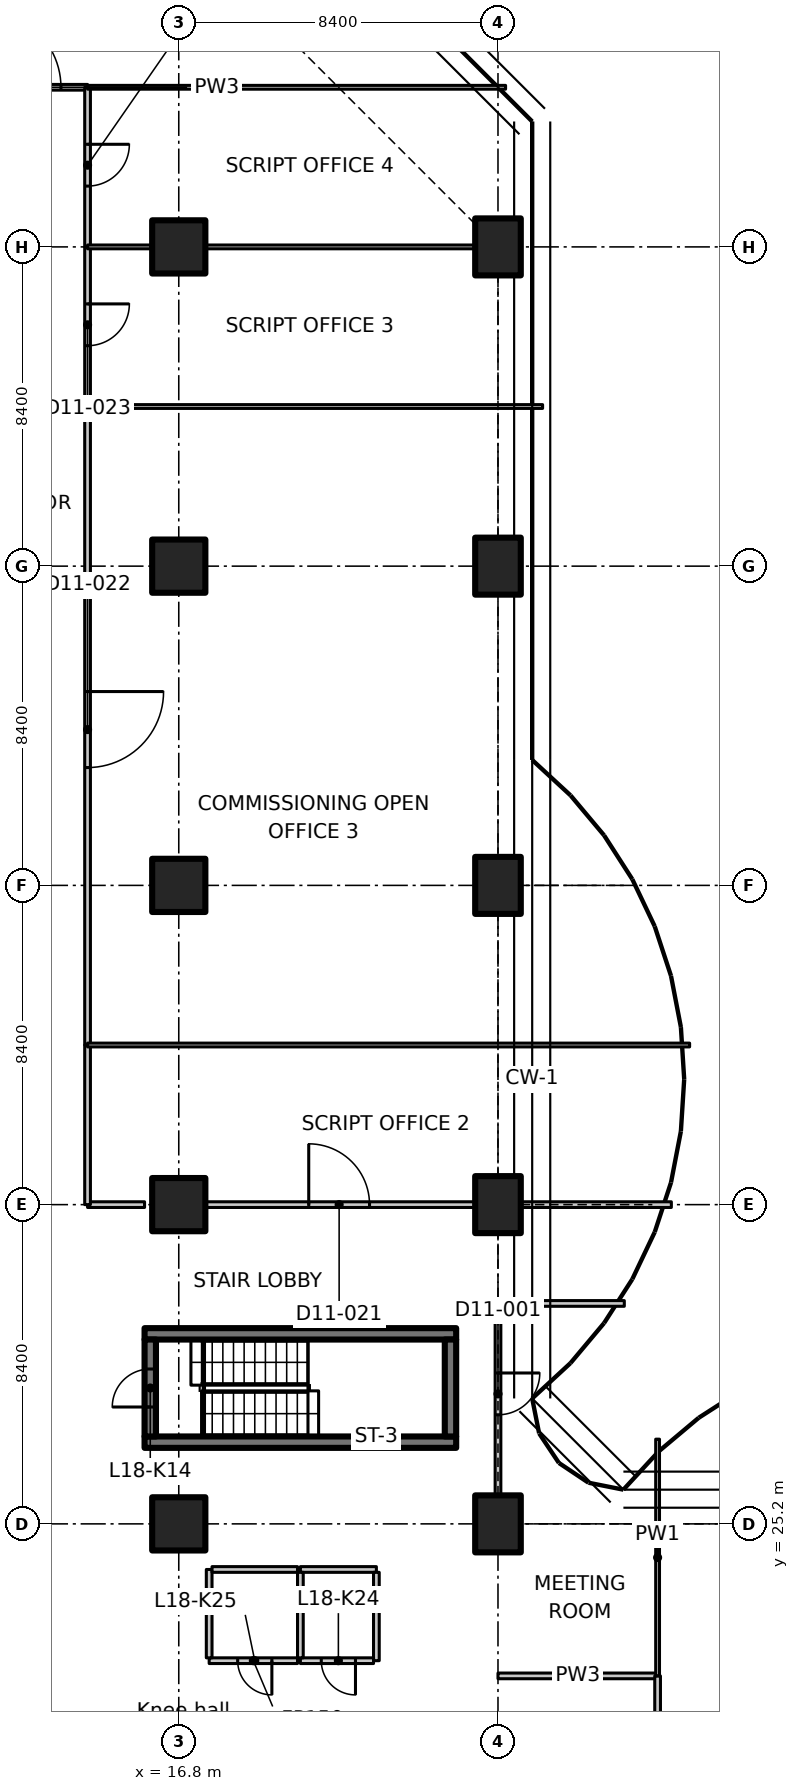
"""IFC4 building model, lengths in metres.
Left out: names, types, materials, properties, quantities, classifications, styles, units other than length and angle.
Written with IfcOpenShell. Run it as: python <this file> out.ifc"""

import sys

from ifc_helpers import new_model, si_unit, direction, frame, frame_2d, origin, origin_2d, place, context, subcontext, project, spatial, polyline, rectangle, outline, extrude, element, fill, save


model = new_model("IFC4")
c1 = context("Model", 3, precision=1e-05, world=origin(), true_north=direction((0.0, 1.0)))
c2 = subcontext(c1, "Body", "Model", "MODEL_VIEW")
j1 = project(units=[si_unit("LENGTHUNIT", "METRE"), si_unit("PLANEANGLEUNIT", "RADIAN")], contexts=[c1])
p1 = place(None, origin())
s1 = spatial("IfcSite", under=j1, at=p1, CompositionType="ELEMENT")
p2 = place(p1, origin())
s2 = spatial("IfcBuilding", under=s1, at=p2, CompositionType="ELEMENT")
p3 = place(p2, frame((0.0, 0.0, 79.7)))
s3 = spatial("IfcBuildingStorey", under=s2, at=p3, CompositionType="ELEMENT", Elevation=79.7)
for number, where, z_axis, x_axis in (
    (1, (16.8, 25.2, 0.0), (0.0, 0.0, 1.0), (1.0, 0.0, 0.0)),
    (2, (16.8, 33.6, 0.0), (0.0, 0.0, 1.0), (1.0, 0.0, 0.0)),
    (3, (16.8, 42.0, 0.0), (0.0, 0.0, 1.0), (1.0, 0.0, 0.0)),
    (4, (16.8, 50.4, 0.0), (0.0, 0.0, 1.0), (1.0, 0.0, 0.0)),
    (5, (16.8, 58.8, 0.0), (0.0, 0.0, 1.0), (1.0, 0.0, 0.0)),
):
    element("IfcColumn", number, at=place(p3, frame(where, z_axis=z_axis, x_axis=x_axis)), inside=s3, PredefinedType="COLUMN", context=c2, shape_type="SweptSolid", body=[
        extrude(rectangle(XDim=1.4, YDim=1.4, at=origin_2d()), origin(), (0.0, 0.0, 1.0), 3.35),
    ])
for number, where, z_axis, x_axis in (
    (6, (25.2, 25.2, 0.0), (0.0, 0.0, 1.0), (1.0, 0.0, 0.0)),
    (7, (25.2, 33.6, 0.0), (0.0, 0.0, 1.0), (1.0, 0.0, 0.0)),
    (8, (25.2, 42.0, 0.0), (0.0, 0.0, 1.0), (1.0, 0.0, 0.0)),
    (9, (25.2, 50.4, 0.0), (0.0, 0.0, 1.0), (1.0, 0.0, 0.0)),
    (10, (25.2, 58.8, 0.0), (0.0, 0.0, 1.0), (1.0, 0.0, 0.0)),
):
    element("IfcColumn", number, at=place(p3, frame(where, z_axis=z_axis, x_axis=x_axis)), inside=s3, PredefinedType="COLUMN", context=c2, shape_type="SweptSolid", body=[
        extrude(rectangle(XDim=1.2, YDim=1.5, at=origin_2d()), origin(), (0.0, 0.0, 1.0), 3.35),
    ])
for number, where, z_axis, x_axis in (
    (11, (15.9, 27.35, 0.0), (0.0, 0.0, 1.0), (1.0, 0.0, 0.0)),
    (12, (15.9, 30.2, 0.0), (0.0, 0.0, 1.0), (1.0, 0.0, 0.0)),
):
    element("IfcWall", number, at=place(p3, frame(where, z_axis=z_axis, x_axis=x_axis)), inside=s3, PredefinedType="SHEAR", context=c2, shape_type="SweptSolid", body=[
        extrude(rectangle(XDim=8.2, YDim=0.3, at=frame_2d((4.1, 0.0))), origin(), (0.0, 0.0, 1.0), 3.35),
    ])
p4 = place(p3, frame((16.05, 27.5, 0.0), z_axis=(0.0, 0.0, 1.0), x_axis=(0.0, 1.0, 0.0)))
e13 = element("IfcWall", 13, at=p4, inside=s3, PredefinedType="SHEAR", context=c2, shape_type="SweptSolid", body=[
    extrude(rectangle(XDim=2.55, YDim=0.3, at=frame_2d((1.275, 0.0))), origin(), (0.0, 0.0, 1.0), 3.35),
])
p5 = place(p4, frame((0.775, 0.0, 0.0)))
e14 = element("IfcOpeningElement", 14, at=p5, cuts=e13, PredefinedType="OPENING", context=c2, shape_type="SweptSolid", body=[
    extrude(rectangle(XDim=1.0, YDim=2.1, at=frame_2d((0.5, 1.05))), frame((0.0, 0.16, 0.0), z_axis=(0.0, -1.0, 0.0), x_axis=(1.0, 0.0, 0.0)), (0.0, 0.0, 1.0), 0.32),
])
p6 = place(p3, frame((23.95, 27.5, 0.0), z_axis=(0.0, 0.0, 1.0), x_axis=(0.0, 1.0, 0.0)))
e15 = element("IfcWall", 15, at=p6, inside=s3, PredefinedType="SHEAR", context=c2, shape_type="SweptSolid", body=[
    extrude(rectangle(XDim=2.55, YDim=0.3, at=frame_2d((1.275, 0.0))), origin(), (0.0, 0.0, 1.0), 3.35),
])
p7 = place(p3, frame((20.0, 24.0, 0.0), z_axis=(0.0, 0.0, 1.0), x_axis=(1.0, 0.0, 0.0)))
e16 = element("IfcWall", 16, at=p7, inside=s3, PredefinedType="PARTITIONING", context=c2, shape_type="SweptSolid", body=[
    extrude(rectangle(XDim=2.0, YDim=0.15, at=frame_2d((1.0, 0.0))), origin(), (0.0, 0.0, 1.0), 3.35),
])
p8 = place(p3, frame((22.0, 23.925, 0.0), z_axis=(0.0, 0.0, 1.0), x_axis=(0.0, -1.0, 0.0)))
e17 = element("IfcWall", 17, at=p8, inside=s3, PredefinedType="PARTITIONING", context=c2, shape_type="SweptSolid", body=[
    extrude(rectangle(XDim=2.325, YDim=0.15, at=frame_2d((1.163, 0.0))), origin(), (0.0, 0.0, 1.0), 3.35),
])
p9 = place(p3, frame((21.925, 21.6, 0.0), z_axis=(0.0, 0.0, 1.0), x_axis=(-1.0, 0.0, 0.0)))
e18 = element("IfcWall", 18, at=p9, inside=s3, PredefinedType="PARTITIONING", context=c2, shape_type="SweptSolid", body=[
    extrude(rectangle(XDim=1.925, YDim=0.15, at=frame_2d((0.962, 0.0))), origin(), (0.0, 0.0, 1.0), 3.35),
])
p10 = place(p9, frame((0.475, 0.0, 0.0)))
e19 = element("IfcOpeningElement", 19, at=p10, cuts=e18, PredefinedType="OPENING", context=c2, shape_type="SweptSolid", body=[
    extrude(rectangle(XDim=0.9, YDim=2.1, at=frame_2d((0.45, 1.05))), frame((0.0, 0.085, 0.0), z_axis=(0.0, -1.0, 0.0), x_axis=(1.0, 0.0, 0.0)), (0.0, 0.0, 1.0), 0.17),
])
p11 = place(p3, frame((20.0, 21.675, 0.0), z_axis=(0.0, 0.0, 1.0), x_axis=(0.0, 1.0, 0.0)))
e20 = element("IfcWall", 20, at=p11, inside=s3, PredefinedType="PARTITIONING", context=c2, shape_type="SweptSolid", body=[
    extrude(rectangle(XDim=2.25, YDim=0.15, at=frame_2d((1.125, 0.0))), origin(), (0.0, 0.0, 1.0), 3.35),
])
p12 = place(p3, frame((19.925, 21.6, 0.0), z_axis=(0.0, 0.0, 1.0), x_axis=(-1.0, 0.0, 0.0)))
e21 = element("IfcWall", 21, at=p12, inside=s3, PredefinedType="PARTITIONING", context=c2, shape_type="SweptSolid", body=[
    extrude(rectangle(XDim=2.325, YDim=0.15, at=frame_2d((1.163, 0.0))), origin(), (0.0, 0.0, 1.0), 3.35),
])
p13 = place(p12, frame((0.675, 0.0, 0.0)))
e22 = element("IfcOpeningElement", 22, at=p13, cuts=e21, PredefinedType="OPENING", context=c2, shape_type="SweptSolid", body=[
    extrude(rectangle(XDim=0.9, YDim=2.1, at=frame_2d((0.45, 1.05))), frame((0.0, 0.085, 0.0), z_axis=(0.0, -1.0, 0.0), x_axis=(1.0, 0.0, 0.0)), (0.0, 0.0, 1.0), 0.17),
])
p14 = place(p3, frame((17.6, 21.675, 0.0), z_axis=(0.0, 0.0, 1.0), x_axis=(0.0, 1.0, 0.0)))
e23 = element("IfcWall", 23, at=p14, inside=s3, PredefinedType="PARTITIONING", context=c2, shape_type="SweptSolid", body=[
    extrude(rectangle(XDim=2.325, YDim=0.15, at=frame_2d((1.163, 0.0))), origin(), (0.0, 0.0, 1.0), 3.35),
])
p15 = place(p3, frame((17.675, 24.0, 0.0), z_axis=(0.0, 0.0, 1.0), x_axis=(1.0, 0.0, 0.0)))
e24 = element("IfcWall", 24, at=p15, inside=s3, PredefinedType="PARTITIONING", context=c2, shape_type="SweptSolid", body=[
    extrude(rectangle(XDim=2.25, YDim=0.15, at=frame_2d((1.125, 0.0))), origin(), (0.0, 0.0, 1.0), 3.35),
])
p16 = place(p3, frame((25.2, 21.2, 0.0), z_axis=(0.0, 0.0, 1.0), x_axis=(1.0, 0.0, 0.0)))
e25 = element("IfcWall", 25, at=p16, inside=s3, PredefinedType="PARTITIONING", context=c2, shape_type="SweptSolid", body=[
    extrude(rectangle(XDim=4.2, YDim=0.15, at=frame_2d((2.1, 0.0))), origin(), (0.0, 0.0, 1.0), 3.33),
])
p17 = place(p3, frame((29.4, 21.2, 0.0), z_axis=(0.0, 0.0, 1.0), x_axis=(0.0, -1.0, 0.0)))
e26 = element("IfcWall", 26, at=p17, inside=s3, PredefinedType="PARTITIONING", context=c2, shape_type="SweptSolid", body=[
    extrude(rectangle(XDim=8.2, YDim=0.15, at=frame_2d((4.1, 0.0))), origin(), (0.0, 0.0, 1.0), 3.33),
])
p18 = place(p3, frame((29.4, 27.429, 0.0), z_axis=(0.0, 0.0, 1.0), x_axis=(0.0, -1.0, 0.0)))
e27 = element("IfcWall", 27, at=p18, inside=s3, PredefinedType="PARTITIONING", context=c2, shape_type="SweptSolid", body=[
    extrude(outline(polyline([(0.0, 0.0), (6.229, 0.0), (6.229, 3.33), (2.679, 3.33), (2.677, 2.98), (1.781, 2.98), (1.779, 3.33), (0.154, 3.33), (0.0, 3.33), (0.0, 0.0)])), frame((0.0, 0.05, 0.0), z_axis=(0.0, -1.0, 0.0), x_axis=(1.0, 0.0, 0.0)), (0.0, 0.0, 1.0), 0.1),
])
p19 = place(p3, frame((25.2, 31.0, 0.0), z_axis=(0.0, 0.0, 1.0), x_axis=(0.0, -1.0, 0.0)))
e28 = element("IfcWall", 28, at=p19, inside=s3, PredefinedType="PARTITIONING", context=c2, shape_type="SweptSolid", body=[
    extrude(outline(polyline([(0.0, 0.0), (5.03, 0.0), (5.03, 2.98), (0.0, 2.98), (0.0, 0.0)])), frame((0.0, 0.075, 0.0), z_axis=(0.0, -1.0, 0.0), x_axis=(1.0, 0.0, 0.0)), (0.0, 0.0, 1.0), 0.15),
])
p20 = place(p19, frame((1.83, 0.0, 0.0)))
e29 = element("IfcOpeningElement", 29, at=p20, cuts=e28, PredefinedType="OPENING", context=c2, shape_type="SweptSolid", body=[
    extrude(rectangle(XDim=1.1, YDim=2.1, at=frame_2d((0.55, 1.05))), frame((0.0, 0.085, 0.0), z_axis=(0.0, -1.0, 0.0), x_axis=(1.0, 0.0, 0.0)), (0.0, 0.0, 1.0), 0.17),
])
p21 = place(p3, frame((25.2, 31.0, 0.0), z_axis=(0.0, 0.0, 1.0), x_axis=(1.0, 0.0, 0.0)))
e30 = element("IfcWall", 30, at=p21, inside=s3, PredefinedType="PARTITIONING", context=c2, shape_type="SweptSolid", body=[
    extrude(rectangle(XDim=3.324, YDim=0.15, at=frame_2d((1.662, 0.0))), origin(), (0.0, 0.0, 1.0), 2.98),
])
p22 = place(p3, frame((14.4, 33.6, 0.0), z_axis=(0.0, 0.0, 1.0), x_axis=(1.0, 0.0, 0.0)))
e31 = element("IfcWall", 31, at=p22, inside=s3, PredefinedType="PARTITIONING", context=c2, shape_type="SweptSolid", body=[
    extrude(rectangle(XDim=1.5, YDim=0.15, at=frame_2d((0.75, 0.0))), origin(), (0.0, 0.0, 1.0), 3.33),
])
p23 = place(p3, frame((17.52, 33.6, 0.0), z_axis=(0.0, 0.0, 1.0), x_axis=(1.0, 0.0, 0.0)))
e32 = element("IfcWall", 32, at=p23, inside=s3, PredefinedType="PARTITIONING", context=c2, shape_type="SweptSolid", body=[
    extrude(rectangle(XDim=7.06, YDim=0.15, at=frame_2d((3.53, 0.0))), origin(), (0.0, 0.0, 1.0), 3.33),
])
p24 = place(p23, frame((2.7, 0.0, 0.0)))
e33 = element("IfcOpeningElement", 33, at=p24, cuts=e32, PredefinedType="OPENING", context=c2, shape_type="SweptSolid", body=[
    extrude(rectangle(XDim=1.6, YDim=2.1, at=frame_2d((0.8, 1.05))), frame((0.0, 0.085, 0.0), z_axis=(0.0, -1.0, 0.0), x_axis=(1.0, 0.0, 0.0)), (0.0, 0.0, 1.0), 0.17),
])
p25 = place(p3, frame((25.82, 33.6, 0.0), z_axis=(0.0, 0.0, 1.0), x_axis=(1.0, 0.0, 0.0)))
e34 = element("IfcWall", 34, at=p25, inside=s3, PredefinedType="PARTITIONING", context=c2, shape_type="SweptSolid", body=[
    extrude(rectangle(XDim=3.942, YDim=0.15, at=frame_2d((1.971, 0.0))), origin(), (0.0, 0.0, 1.0), 2.98),
])
p26 = place(p3, frame((10.8, 63.0, 0.0), z_axis=(0.0, 0.0, 1.0), x_axis=(1.0, 0.0, 0.0)))
e35 = element("IfcWall", 35, at=p26, inside=s3, PredefinedType="PARTITIONING", context=c2, shape_type="SweptSolid", body=[
    extrude(rectangle(XDim=3.6, YDim=0.15, at=frame_2d((1.8, 0.0))), origin(), (0.0, 0.0, 1.0), 3.33),
])
p27 = place(p26, frame((0.9, 0.0, 0.0)))
e36 = element("IfcOpeningElement", 36, at=p27, cuts=e35, PredefinedType="OPENING", context=c2, shape_type="SweptSolid", body=[
    extrude(rectangle(XDim=2.0, YDim=2.4, at=frame_2d((1.0, 1.2))), frame((0.0, 0.085, 0.0), z_axis=(0.0, -1.0, 0.0), x_axis=(1.0, 0.0, 0.0)), (0.0, 0.0, 1.0), 0.17),
])
p28 = place(p3, frame((14.4, 37.8, 0.0), z_axis=(0.0, 0.0, 1.0), x_axis=(0.0, -1.0, 0.0)))
e37 = element("IfcWall", 37, at=p28, inside=s3, PredefinedType="PARTITIONING", context=c2, shape_type="SweptSolid", body=[
    extrude(rectangle(XDim=4.2, YDim=0.15, at=frame_2d((2.1, 0.0))), origin(), (0.0, 0.0, 1.0), 3.33),
])
p29 = place(p3, frame((14.4, 54.6, 0.0), z_axis=(0.0, 0.0, 1.0), x_axis=(0.0, -1.0, 0.0)))
e38 = element("IfcWall", 38, at=p29, inside=s3, PredefinedType="PARTITIONING", context=c2, shape_type="SweptSolid", body=[
    extrude(rectangle(XDim=16.8, YDim=0.15, at=frame_2d((8.4, 0.0))), origin(), (0.0, 0.0, 1.0), 3.33),
])
p30 = place(p29, frame((7.5, 0.0, 0.0)))
e39 = element("IfcOpeningElement", 39, at=p30, cuts=e38, PredefinedType="OPENING", context=c2, shape_type="SweptSolid", body=[
    extrude(rectangle(XDim=2.0, YDim=2.4, at=frame_2d((1.0, 1.2))), frame((0.0, 0.085, 0.0), z_axis=(0.0, -1.0, 0.0), x_axis=(1.0, 0.0, 0.0)), (0.0, 0.0, 1.0), 0.17),
])
p31 = place(p3, frame((14.4, 58.8, 0.0), z_axis=(0.0, 0.0, 1.0), x_axis=(0.0, -1.0, 0.0)))
e40 = element("IfcWall", 40, at=p31, inside=s3, PredefinedType="PARTITIONING", context=c2, shape_type="SweptSolid", body=[
    extrude(rectangle(XDim=4.2, YDim=0.15, at=frame_2d((2.1, 0.0))), origin(), (0.0, 0.0, 1.0), 3.33),
])
p32 = place(p31, frame((1.5, 0.0, 0.0)))
e41 = element("IfcOpeningElement", 41, at=p32, cuts=e40, PredefinedType="OPENING", context=c2, shape_type="SweptSolid", body=[
    extrude(rectangle(XDim=1.1, YDim=2.1, at=frame_2d((0.55, 1.05))), frame((0.0, 0.085, 0.0), z_axis=(0.0, -1.0, 0.0), x_axis=(1.0, 0.0, 0.0)), (0.0, 0.0, 1.0), 0.17),
])
p33 = place(p3, frame((14.4, 63.0, 0.0), z_axis=(0.0, 0.0, 1.0), x_axis=(0.0, -1.0, 0.0)))
e42 = element("IfcWall", 42, at=p33, inside=s3, PredefinedType="PARTITIONING", context=c2, shape_type="SweptSolid", body=[
    extrude(rectangle(XDim=4.2, YDim=0.15, at=frame_2d((2.1, 0.0))), origin(), (0.0, 0.0, 1.0), 3.33),
])
p34 = place(p33, frame((1.5, 0.0, 0.0)))
e43 = element("IfcOpeningElement", 43, at=p34, cuts=e42, PredefinedType="OPENING", context=c2, shape_type="SweptSolid", body=[
    extrude(rectangle(XDim=1.1, YDim=2.1, at=frame_2d((0.55, 1.05))), frame((0.0, 0.085, 0.0), z_axis=(0.0, -1.0, 0.0), x_axis=(1.0, 0.0, 0.0)), (0.0, 0.0, 1.0), 0.17),
])
p35 = place(p3, frame((25.4, 63.0, 0.0), z_axis=(0.0, 0.0, 1.0), x_axis=(-1.0, 0.0, 0.0)))
e44 = element("IfcWall", 44, at=p35, inside=s3, PredefinedType="PARTITIONING", context=c2, shape_type="SweptSolid", body=[
    extrude(outline(polyline([(0.0, 0.0), (11.0, 0.0), (11.0, 3.33), (5.066, 3.33), (5.064, 2.98), (3.736, 2.98), (3.734, 3.33), (0.0, 3.33), (0.0, 0.0)])), frame((0.0, 0.05, 0.0), z_axis=(0.0, -1.0, 0.0), x_axis=(1.0, 0.0, 0.0)), (0.0, 0.0, 1.0), 0.1),
])
p36 = place(p3, frame((14.4, 37.8, 0.0), z_axis=(0.0, 0.0, 1.0), x_axis=(1.0, 0.0, 0.0)))
e45 = element("IfcWall", 45, at=p36, inside=s3, PredefinedType="PARTITIONING", context=c2, shape_type="SweptSolid", body=[
    extrude(outline(polyline([(0.0, 0.0), (15.843, 0.0), (15.843, 3.33), (11.25, 3.33), (11.248, 2.98), (10.352, 2.98), (10.35, 3.33), (0.0, 3.33), (0.0, 0.0)])), frame((0.0, 0.05, 0.0), z_axis=(0.0, -1.0, 0.0), x_axis=(1.0, 0.0, 0.0)), (0.0, 0.0, 1.0), 0.1),
])
p37 = place(p3, frame((14.4, 54.6, 0.0), z_axis=(0.0, 0.0, 1.0), x_axis=(1.0, 0.0, 0.0)))
e46 = element("IfcWall", 46, at=p37, inside=s3, PredefinedType="PARTITIONING", context=c2, shape_type="SweptSolid", body=[
    extrude(outline(polyline([(0.0, 0.0), (11.974, 0.0), (11.974, 3.33), (11.9, 3.33), (11.25, 3.33), (11.248, 2.98), (10.352, 2.98), (10.35, 3.33), (0.0, 3.33), (0.0, 0.0)])), frame((0.0, 0.05, 0.0), z_axis=(0.0, -1.0, 0.0), x_axis=(1.0, 0.0, 0.0)), (0.0, 0.0, 1.0), 0.1),
])
p38 = place(p3, frame((14.4, 58.8, 0.0), z_axis=(0.0, 0.0, 1.0), x_axis=(1.0, 0.0, 0.0)))
e47 = element("IfcWall", 47, at=p38, inside=s3, PredefinedType="PARTITIONING", context=c2, shape_type="SweptSolid", body=[
    extrude(rectangle(XDim=1.68, YDim=0.1, at=frame_2d((0.84, 0.0))), origin(), (0.0, 0.0, 1.0), 3.33),
])
p39 = place(p3, frame((17.52, 58.8, 0.0), z_axis=(0.0, 0.0, 1.0), x_axis=(1.0, 0.0, 0.0)))
e48 = element("IfcWall", 48, at=p39, inside=s3, PredefinedType="PARTITIONING", context=c2, shape_type="SweptSolid", body=[
    extrude(rectangle(XDim=7.06, YDim=0.1, at=frame_2d((3.53, 0.0))), origin(), (0.0, 0.0, 1.0), 3.33),
])
p40 = place(p5, origin())
e49 = element("IfcDoor", 49, at=p40, inside=s3, OperationType="SINGLE_SWING_RIGHT", PredefinedType="DOOR", context=c2, shape_type="SweptSolid", body=[
    extrude(rectangle(XDim=1.0, YDim=2.1, at=frame_2d((0.5, 1.05))), frame((0.0, 0.025, 0.0), z_axis=(0.0, -1.0, 0.0), x_axis=(1.0, 0.0, 0.0)), (0.0, 0.0, 1.0), 0.05),
])
fill(e14, e49)
p41 = place(p10, origin())
e50 = element("IfcDoor", 50, at=p41, inside=s3, OperationType="SINGLE_SWING_RIGHT", PredefinedType="DOOR", context=c2, shape_type="SweptSolid", body=[
    extrude(rectangle(XDim=0.9, YDim=2.1, at=frame_2d((0.45, 1.05))), frame((0.0, 0.025, 0.0), z_axis=(0.0, -1.0, 0.0), x_axis=(1.0, 0.0, 0.0)), (0.0, 0.0, 1.0), 0.05),
])
fill(e19, e50)
p42 = place(p13, origin())
e51 = element("IfcDoor", 51, at=p42, inside=s3, OperationType="SINGLE_SWING_LEFT", PredefinedType="DOOR", context=c2, shape_type="SweptSolid", body=[
    extrude(rectangle(XDim=0.9, YDim=2.1, at=frame_2d((0.45, 1.05))), frame((0.0, 0.025, 0.0), z_axis=(0.0, -1.0, 0.0), x_axis=(1.0, 0.0, 0.0)), (0.0, 0.0, 1.0), 0.05),
])
fill(e22, e51)
p43 = place(p20, origin())
e52 = element("IfcDoor", 52, at=p43, inside=s3, OperationType="SINGLE_SWING_RIGHT", PredefinedType="DOOR", context=c2, shape_type="SweptSolid", body=[
    extrude(rectangle(XDim=1.1, YDim=2.1, at=frame_2d((0.55, 1.05))), frame((0.0, 0.025, 0.0), z_axis=(0.0, -1.0, 0.0), x_axis=(1.0, 0.0, 0.0)), (0.0, 0.0, 1.0), 0.05),
])
fill(e29, e52)
p44 = place(p27, origin())
e53 = element("IfcDoor", 53, at=p44, inside=s3, OperationType="DOUBLE_DOOR_SINGLE_SWING", PredefinedType="DOOR", context=c2, shape_type="SweptSolid", body=[
    extrude(rectangle(XDim=2.0, YDim=2.4, at=frame_2d((1.0, 1.2))), frame((0.0, 0.025, 0.0), z_axis=(0.0, -1.0, 0.0), x_axis=(1.0, 0.0, 0.0)), (0.0, 0.0, 1.0), 0.05),
])
fill(e36, e53)
p45 = place(p24, origin())
e54 = element("IfcDoor", 54, at=p45, inside=s3, OperationType="DOUBLE_DOOR_SINGLE_SWING", PredefinedType="DOOR", context=c2, shape_type="SweptSolid", body=[
    extrude(rectangle(XDim=1.6, YDim=2.1, at=frame_2d((0.8, 1.05))), frame((0.0, 0.025, 0.0), z_axis=(0.0, -1.0, 0.0), x_axis=(1.0, 0.0, 0.0)), (0.0, 0.0, 1.0), 0.05),
])
fill(e33, e54)
p46 = place(p30, origin())
e55 = element("IfcDoor", 55, at=p46, inside=s3, OperationType="DOUBLE_DOOR_SINGLE_SWING", PredefinedType="DOOR", context=c2, shape_type="SweptSolid", body=[
    extrude(rectangle(XDim=2.0, YDim=2.4, at=frame_2d((1.0, 1.2))), frame((0.0, 0.025, 0.0), z_axis=(0.0, -1.0, 0.0), x_axis=(1.0, 0.0, 0.0)), (0.0, 0.0, 1.0), 0.05),
])
fill(e39, e55)
p47 = place(p32, origin())
e56 = element("IfcDoor", 56, at=p47, inside=s3, OperationType="SINGLE_SWING_LEFT", PredefinedType="DOOR", context=c2, shape_type="SweptSolid", body=[
    extrude(rectangle(XDim=1.1, YDim=2.1, at=frame_2d((0.55, 1.05))), frame((0.0, 0.025, 0.0), z_axis=(0.0, -1.0, 0.0), x_axis=(1.0, 0.0, 0.0)), (0.0, 0.0, 1.0), 0.05),
])
fill(e41, e56)
p48 = place(p34, origin())
e57 = element("IfcDoor", 57, at=p48, inside=s3, OperationType="SINGLE_SWING_LEFT", PredefinedType="DOOR", context=c2, shape_type="SweptSolid", body=[
    extrude(rectangle(XDim=1.1, YDim=2.1, at=frame_2d((0.55, 1.05))), frame((0.0, 0.025, 0.0), z_axis=(0.0, -1.0, 0.0), x_axis=(1.0, 0.0, 0.0)), (0.0, 0.0, 1.0), 0.05),
])
fill(e43, e57)
save(model, sys.argv[1])
